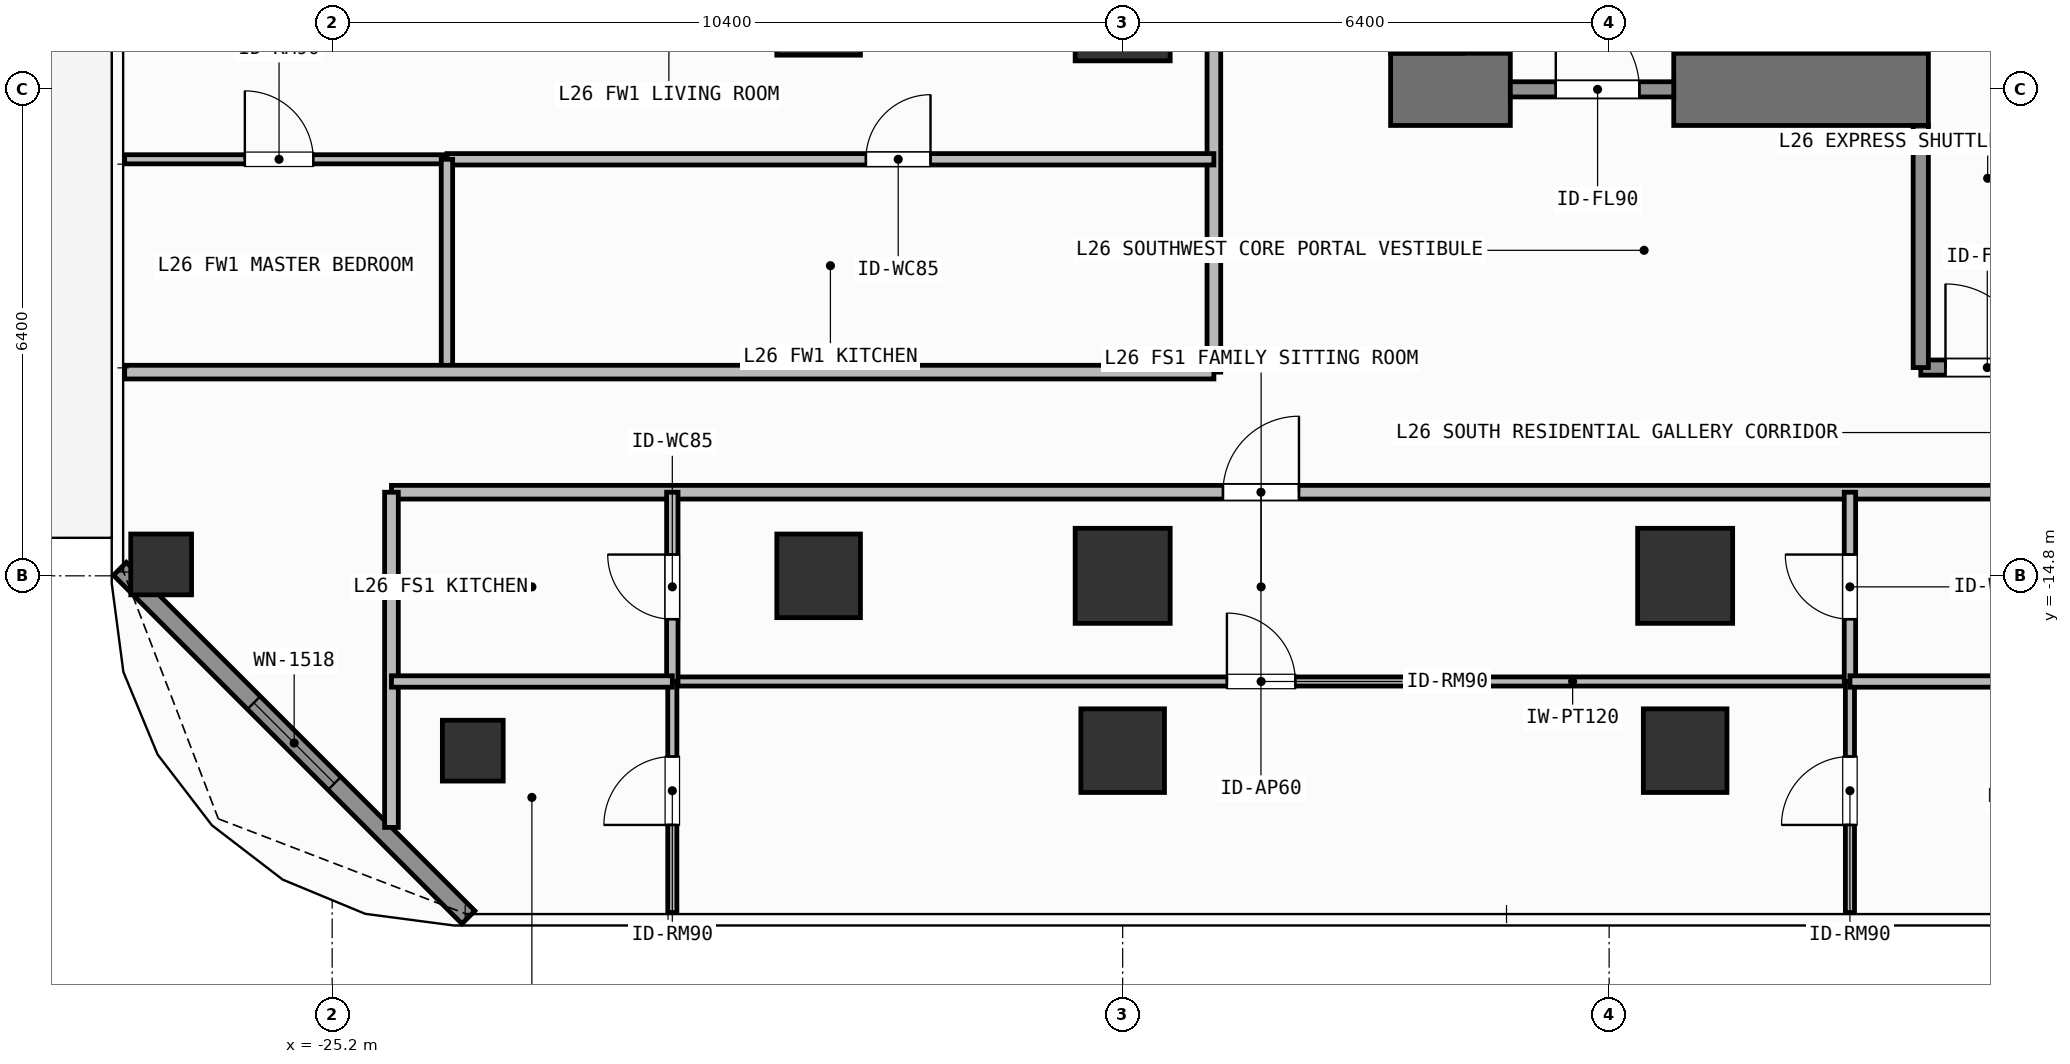
"""IFC4 building model, lengths in metres.
Left out: names, types, materials, properties, quantities, classifications, styles, units other than length and angle.
Written with IfcOpenShell. Run it as: python <this file> out.ifc"""

import sys

from ifc_helpers import new_model, si_unit, direction, frame, frame_2d, origin, origin_2d, place, context, subcontext, project, spatial, rectangle, hollow_rectangle, extrude, element, fill, save


model = new_model("IFC4")
c1 = context("Model", 3, precision=1e-05, world=origin(), true_north=direction((0.0, 1.0)))
c2 = subcontext(c1, "Body", "Model", "MODEL_VIEW")
j1 = project(units=[si_unit("LENGTHUNIT", "METRE"), si_unit("PLANEANGLEUNIT", "RADIAN")], contexts=[c1])
p1 = place(None, origin())
s1 = spatial("IfcSite", under=j1, at=p1, CompositionType="ELEMENT")
p2 = place(p1, origin())
s2 = spatial("IfcBuilding", under=s1, at=p2, CompositionType="ELEMENT")
p3 = place(p2, frame((0.0, 0.0, 104.7)))
s3 = spatial("IfcBuildingStorey", under=s2, at=p3, CompositionType="ELEMENT", Elevation=104.7)
p4 = place(p3, frame((-11.275, -8.4, 0.0), z_axis=(0.0, 0.0, 1.0), x_axis=(1.0, 0.0, 0.0)))
e1 = element("IfcWall", 1, at=p4, inside=s3, PredefinedType="SHEAR", context=c2, shape_type="SweptSolid", body=[
    extrude(rectangle(XDim=1.575, YDim=0.95, at=frame_2d((0.788, 0.0))), origin(), (0.0, 0.0, 1.0), 3.9),
])
p5 = place(p3, frame((-7.55, -8.4, 0.0), z_axis=(0.0, 0.0, 1.0), x_axis=(1.0, 0.0, 0.0)))
e2 = element("IfcWall", 2, at=p5, inside=s3, PredefinedType="SHEAR", context=c2, shape_type="SweptSolid", body=[
    extrude(rectangle(XDim=3.35, YDim=0.95, at=frame_2d((1.675, 0.0))), origin(), (0.0, 0.0, 1.0), 3.9),
])
p6 = place(p3, frame((-10.8, -7.925, 0.0), z_axis=(0.0, 0.0, 1.0), x_axis=(0.0, 1.0, 0.0)))
e3 = element("IfcWall", 3, at=p6, inside=s3, PredefinedType="SHEAR", context=c2, shape_type="SweptSolid", body=[
    extrude(rectangle(XDim=15.85, YDim=0.95, at=frame_2d((7.925, 0.0))), origin(), (0.0, 0.0, 1.0), 3.9),
])
for number, where, z_axis, x_axis in (
    (4, (-14.8, -14.8, 0.0), (0.0, 0.0, 1.0), (1.0, 0.0, 0.0)),
    (5, (-7.4, -14.8, 0.0), (0.0, 0.0, 1.0), (1.0, 0.0, 0.0)),
    (6, (-14.8, -7.4, 0.0), (0.0, 0.0, 1.0), (1.0, 0.0, 0.0)),
):
    element("IfcColumn", number, at=place(p3, frame(where, z_axis=z_axis, x_axis=x_axis)), inside=s3, PredefinedType="COLUMN", context=c2, shape_type="SweptSolid", body=[
        extrude(rectangle(XDim=1.25, YDim=1.25, at=origin_2d()), origin(), (0.0, 0.0, 1.0), 3.9),
    ])
for number, where, z_axis, x_axis in (
    (7, (-18.8, -14.8, 0.0), (0.0, 0.0, 1.0), (1.0, 0.0, 0.0)),
    (8, (-18.8, -7.4, 0.0), (0.0, 0.0, 1.0), (1.0, 0.0, 0.0)),
    (9, (-14.8, -17.1, 0.0), (0.0, 0.0, 1.0), (1.0, 0.0, 0.0)),
    (10, (-7.4, -17.1, 0.0), (0.0, 0.0, 1.0), (1.0, 0.0, 0.0)),
):
    element("IfcColumn", number, at=place(p3, frame(where, z_axis=z_axis, x_axis=x_axis)), inside=s3, PredefinedType="COLUMN", context=c2, shape_type="SweptSolid", body=[
        extrude(rectangle(XDim=1.1, YDim=1.1, at=origin_2d()), origin(), (0.0, 0.0, 1.0), 3.9),
    ])
for number, where, z_axis, x_axis in (
    (11, (-23.35, -17.1, 0.0), (0.0, 0.0, 1.0), (1.0, 0.0, 0.0)),
    (12, (-27.45, -14.65, 0.0), (0.0, 0.0, 1.0), (1.0, 0.0, 0.0)),
):
    element("IfcColumn", number, at=place(p3, frame(where, z_axis=z_axis, x_axis=x_axis)), inside=s3, PredefinedType="COLUMN", context=c2, shape_type="SweptSolid", body=[
        extrude(hollow_rectangle(XDim=0.8, YDim=0.8, WallThickness=0.036, at=origin_2d()), origin(), (0.0, 0.0, 1.0), 3.9),
    ])
p7 = place(p3, frame((-23.408, -19.292, 0.0), z_axis=(0.0, 0.0, 1.0), x_axis=(-0.707087954376, 0.707125607496, 0.0)))
e13 = element("IfcWall", 13, at=p7, inside=s3, PredefinedType="SOLIDWALL", context=c2, shape_type="SweptSolid", body=[
    extrude(rectangle(XDim=6.484, YDim=0.24, at=frame_2d((3.242, 0.0))), origin(), (0.0, 0.0, 1.0), 3.62),
])
p8 = place(p7, frame((2.492, 0.0, 0.8)))
e14 = element("IfcOpeningElement", 14, at=p8, cuts=e13, PredefinedType="OPENING", context=c2, shape_type="SweptSolid", body=[
    extrude(rectangle(XDim=1.5, YDim=1.85, at=frame_2d((0.75, 0.925))), frame((0.0, 0.13, 0.0), z_axis=(0.0, -1.0, 0.0), x_axis=(1.0, 0.0, 0.0)), (0.0, 0.0, 1.0), 0.26),
])
p9 = place(p3, frame((-9.7, -8.4, 0.0), z_axis=(0.0, 0.0, 1.0), x_axis=(1.0, 0.0, 0.0)))
e15 = element("IfcWall", 15, at=p9, inside=s3, PredefinedType="SOLIDWALL", context=c2, shape_type="SweptSolid", body=[
    extrude(rectangle(XDim=2.15, YDim=0.2, at=frame_2d((1.075, 0.0))), origin(), (0.0, 0.0, 1.0), 2.66),
])
p10 = place(p9, frame((0.598, 0.0, 0.0)))
e16 = element("IfcOpeningElement", 16, at=p10, cuts=e15, PredefinedType="OPENING", context=c2, shape_type="SweptSolid", body=[
    extrude(rectangle(XDim=1.1, YDim=2.15, at=frame_2d((0.55, 1.075))), frame((0.0, 0.11, 0.0), z_axis=(0.0, -1.0, 0.0), x_axis=(1.0, 0.0, 0.0)), (0.0, 0.0, 1.0), 0.22),
])
p11 = place(p3, frame((-4.3, -12.06, 0.0), z_axis=(0.0, 0.0, 1.0), x_axis=(1.0, 0.0, 0.0)))
e17 = element("IfcWall", 17, at=p11, inside=s3, PredefinedType="SOLIDWALL", context=c2, shape_type="SweptSolid", body=[
    extrude(rectangle(XDim=1.75, YDim=0.2, at=frame_2d((0.875, 0.0))), origin(), (0.0, 0.0, 1.0), 3.62),
])
p12 = place(p11, frame((0.325, 0.0, 0.0)))
e18 = element("IfcOpeningElement", 18, at=p12, cuts=e17, PredefinedType="OPENING", context=c2, shape_type="SweptSolid", body=[
    extrude(rectangle(XDim=1.1, YDim=2.15, at=frame_2d((0.55, 1.075))), frame((0.0, 0.11, 0.0), z_axis=(0.0, -1.0, 0.0), x_axis=(1.0, 0.0, 0.0)), (0.0, 0.0, 1.0), 0.22),
])
p13 = place(p3, frame((-24.42, -13.7, 0.0), z_axis=(0.0, 0.0, 1.0), x_axis=(1.0, 0.0, 0.0)))
e19 = element("IfcWall", 19, at=p13, inside=s3, PredefinedType="PARTITIONING", context=c2, shape_type="SweptSolid", body=[
    extrude(rectangle(XDim=25.394, YDim=0.18, at=frame_2d((12.697, 0.0))), origin(), (0.0, 0.0, 1.0), 3.62),
])
p14 = place(p13, frame((10.939, 0.0, 0.0)))
e20 = element("IfcOpeningElement", 20, at=p14, cuts=e19, PredefinedType="OPENING", context=c2, shape_type="SweptSolid", body=[
    extrude(rectangle(XDim=1.0, YDim=2.2, at=frame_2d((0.5, 1.1))), frame((0.0, 0.1, 0.0), z_axis=(0.0, -1.0, 0.0), x_axis=(1.0, 0.0, 0.0)), (0.0, 0.0, 1.0), 0.2),
])
p15 = place(p3, frame((-20.725, -16.19, 0.0), z_axis=(0.0, 0.0, 1.0), x_axis=(1.0, 0.0, 0.0)))
e21 = element("IfcWall", 21, at=p15, inside=s3, PredefinedType="PARTITIONING", context=c2, shape_type="SweptSolid", body=[
    extrude(rectangle(XDim=15.493, YDim=0.12, at=frame_2d((7.747, 0.0))), origin(), (0.0, 0.0, 1.0), 3.62),
])
p16 = place(p15, frame((7.296, 0.0, 0.0)))
e22 = element("IfcOpeningElement", 22, at=p16, cuts=e21, PredefinedType="OPENING", context=c2, shape_type="SweptSolid", body=[
    extrude(rectangle(XDim=0.9, YDim=2.1, at=frame_2d((0.45, 1.05))), frame((0.0, 0.07, 0.0), z_axis=(0.0, -1.0, 0.0), x_axis=(1.0, 0.0, 0.0)), (0.0, 0.0, 1.0), 0.14),
])
p17 = place(p3, frame((-20.725, -16.19, 0.0), z_axis=(0.0, 0.0, 1.0), x_axis=(0.0, 1.0, 0.0)))
e23 = element("IfcWall", 23, at=p17, inside=s3, PredefinedType="PARTITIONING", context=c2, shape_type="SweptSolid", body=[
    extrude(rectangle(XDim=2.49, YDim=0.15, at=frame_2d((1.245, 0.0))), origin(), (0.0, 0.0, 1.0), 3.62),
])
p18 = place(p17, frame((0.82, 0.0, 0.0)))
e24 = element("IfcOpeningElement", 24, at=p18, cuts=e23, PredefinedType="OPENING", context=c2, shape_type="SweptSolid", body=[
    extrude(rectangle(XDim=0.85, YDim=2.1, at=frame_2d((0.425, 1.05))), frame((0.0, 0.085, 0.0), z_axis=(0.0, -1.0, 0.0), x_axis=(1.0, 0.0, 0.0)), (0.0, 0.0, 1.0), 0.17),
])
p19 = place(p3, frame((-20.725, -19.23, 0.0), z_axis=(0.0, 0.0, 1.0), x_axis=(0.0, 1.0, 0.0)))
e25 = element("IfcWall", 25, at=p19, inside=s3, PredefinedType="PARTITIONING", context=c2, shape_type="SweptSolid", body=[
    extrude(rectangle(XDim=3.04, YDim=0.12, at=frame_2d((1.52, 0.0))), origin(), (0.0, 0.0, 1.0), 3.62),
])
p20 = place(p19, frame((1.153, 0.0, 0.0)))
e26 = element("IfcOpeningElement", 26, at=p20, cuts=e25, PredefinedType="OPENING", context=c2, shape_type="SweptSolid", body=[
    extrude(rectangle(XDim=0.9, YDim=2.1, at=frame_2d((0.45, 1.05))), frame((0.0, 0.07, 0.0), z_axis=(0.0, -1.0, 0.0), x_axis=(1.0, 0.0, 0.0)), (0.0, 0.0, 1.0), 0.14),
])
p21 = place(p3, frame((-5.232, -16.19, 0.0), z_axis=(0.0, 0.0, 1.0), x_axis=(0.0, 1.0, 0.0)))
e27 = element("IfcWall", 27, at=p21, inside=s3, PredefinedType="PARTITIONING", context=c2, shape_type="SweptSolid", body=[
    extrude(rectangle(XDim=2.49, YDim=0.15, at=frame_2d((1.245, 0.0))), origin(), (0.0, 0.0, 1.0), 3.62),
])
p22 = place(p21, frame((0.82, 0.0, 0.0)))
e28 = element("IfcOpeningElement", 28, at=p22, cuts=e27, PredefinedType="OPENING", context=c2, shape_type="SweptSolid", body=[
    extrude(rectangle(XDim=0.85, YDim=2.1, at=frame_2d((0.425, 1.05))), frame((0.0, 0.085, 0.0), z_axis=(0.0, -1.0, 0.0), x_axis=(1.0, 0.0, 0.0)), (0.0, 0.0, 1.0), 0.17),
])
p23 = place(p3, frame((-5.232, -19.23, 0.0), z_axis=(0.0, 0.0, 1.0), x_axis=(0.0, 1.0, 0.0)))
e29 = element("IfcWall", 29, at=p23, inside=s3, PredefinedType="PARTITIONING", context=c2, shape_type="SweptSolid", body=[
    extrude(rectangle(XDim=3.04, YDim=0.12, at=frame_2d((1.52, 0.0))), origin(), (0.0, 0.0, 1.0), 3.62),
])
p24 = place(p23, frame((1.153, 0.0, 0.0)))
e30 = element("IfcOpeningElement", 30, at=p24, cuts=e29, PredefinedType="OPENING", context=c2, shape_type="SweptSolid", body=[
    extrude(rectangle(XDim=0.9, YDim=2.1, at=frame_2d((0.45, 1.05))), frame((0.0, 0.07, 0.0), z_axis=(0.0, -1.0, 0.0), x_axis=(1.0, 0.0, 0.0)), (0.0, 0.0, 1.0), 0.14),
])
p25 = place(p3, frame((-13.6, -12.12, 0.0), z_axis=(0.0, 0.0, 1.0), x_axis=(0.0, 1.0, 0.0)))
e31 = element("IfcWall", 31, at=p25, inside=s3, PredefinedType="PARTITIONING", context=c2, shape_type="SweptSolid", body=[
    extrude(rectangle(XDim=10.52, YDim=0.18, at=frame_2d((5.26, 0.0))), origin(), (0.0, 0.0, 1.0), 3.62),
])
p26 = place(p25, frame((5.468, 0.0, 0.0)))
e32 = element("IfcOpeningElement", 32, at=p26, cuts=e31, PredefinedType="OPENING", context=c2, shape_type="SweptSolid", body=[
    extrude(rectangle(XDim=1.0, YDim=2.2, at=frame_2d((0.5, 1.1))), frame((0.0, 0.1, 0.0), z_axis=(0.0, -1.0, 0.0), x_axis=(1.0, 0.0, 0.0)), (0.0, 0.0, 1.0), 0.2),
])
p27 = place(p3, frame((-23.69, -9.32, 0.0), z_axis=(0.0, 0.0, 1.0), x_axis=(1.0, 0.0, 0.0)))
e33 = element("IfcWall", 33, at=p27, inside=s3, PredefinedType="PARTITIONING", context=c2, shape_type="SweptSolid", body=[
    extrude(rectangle(XDim=10.09, YDim=0.15, at=frame_2d((5.045, 0.0))), origin(), (0.0, 0.0, 1.0), 3.62),
])
p28 = place(p27, frame((5.512, 0.0, 0.0)))
e34 = element("IfcOpeningElement", 34, at=p28, cuts=e33, PredefinedType="OPENING", context=c2, shape_type="SweptSolid", body=[
    extrude(rectangle(XDim=0.85, YDim=2.1, at=frame_2d((0.425, 1.05))), frame((0.0, 0.085, 0.0), z_axis=(0.0, -1.0, 0.0), x_axis=(1.0, 0.0, 0.0)), (0.0, 0.0, 1.0), 0.17),
])
p29 = place(p3, frame((-27.93, -9.32, 0.0), z_axis=(0.0, 0.0, 1.0), x_axis=(1.0, 0.0, 0.0)))
e35 = element("IfcWall", 35, at=p29, inside=s3, PredefinedType="PARTITIONING", context=c2, shape_type="SweptSolid", body=[
    extrude(rectangle(XDim=4.24, YDim=0.12, at=frame_2d((2.12, 0.0))), origin(), (0.0, 0.0, 1.0), 3.62),
])
p30 = place(p29, frame((1.581, 0.0, 0.0)))
e36 = element("IfcOpeningElement", 36, at=p30, cuts=e35, PredefinedType="OPENING", context=c2, shape_type="SweptSolid", body=[
    extrude(rectangle(XDim=0.9, YDim=2.1, at=frame_2d((0.45, 1.05))), frame((0.0, 0.07, 0.0), z_axis=(0.0, -1.0, 0.0), x_axis=(1.0, 0.0, 0.0)), (0.0, 0.0, 1.0), 0.14),
])
p31 = place(p3, frame((-4.3, -12.06, 0.0), z_axis=(0.0, 0.0, 1.0), x_axis=(0.0, 1.0, 0.0)))
e37 = element("IfcWall", 37, at=p31, inside=s3, PredefinedType="SOLIDWALL", context=c2, shape_type="SweptSolid", body=[
    extrude(rectangle(XDim=3.185, YDim=0.2, at=frame_2d((1.593, 0.0))), origin(), (0.0, 0.0, 1.0), 3.62),
])
p32 = place(p3, frame((-24.42, -18.11, 0.0), z_axis=(0.0, 0.0, 1.0), x_axis=(0.0, 1.0, 0.0)))
e38 = element("IfcWall", 38, at=p32, inside=s3, PredefinedType="PARTITIONING", context=c2, shape_type="SweptSolid", body=[
    extrude(rectangle(XDim=4.41, YDim=0.18, at=frame_2d((2.205, 0.0))), origin(), (0.0, 0.0, 1.0), 3.62),
])
p33 = place(p3, frame((-24.42, -16.19, 0.0), z_axis=(0.0, 0.0, 1.0), x_axis=(1.0, 0.0, 0.0)))
e39 = element("IfcWall", 39, at=p33, inside=s3, PredefinedType="PARTITIONING", context=c2, shape_type="SweptSolid", body=[
    extrude(rectangle(XDim=3.695, YDim=0.15, at=frame_2d((1.847, 0.0))), origin(), (0.0, 0.0, 1.0), 3.62),
])
p34 = place(p3, frame((-5.232, -16.19, 0.0), z_axis=(0.0, 0.0, 1.0), x_axis=(1.0, 0.0, 0.0)))
e40 = element("IfcWall", 40, at=p34, inside=s3, PredefinedType="PARTITIONING", context=c2, shape_type="SweptSolid", body=[
    extrude(rectangle(XDim=6.206, YDim=0.15, at=frame_2d((3.103, 0.0))), origin(), (0.0, 0.0, 1.0), 3.62),
])
p35 = place(p3, frame((-23.69, -12.12, 0.0), z_axis=(0.0, 0.0, 1.0), x_axis=(0.0, 1.0, 0.0)))
e41 = element("IfcWall", 41, at=p35, inside=s3, PredefinedType="PARTITIONING", context=c2, shape_type="SweptSolid", body=[
    extrude(rectangle(XDim=2.8, YDim=0.15, at=frame_2d((1.4, 0.0))), origin(), (0.0, 0.0, 1.0), 3.62),
])
p36 = place(p3, frame((-27.93, -12.12, 0.0), z_axis=(0.0, 0.0, 1.0), x_axis=(1.0, 0.0, 0.0)))
e42 = element("IfcWall", 42, at=p36, inside=s3, PredefinedType="PARTITIONING", context=c2, shape_type="SweptSolid", body=[
    extrude(rectangle(XDim=14.33, YDim=0.18, at=frame_2d((7.165, 0.0))), origin(), (0.0, 0.0, 1.0), 3.62),
])
p37 = place(p8, origin())
e43 = element("IfcWindow", 43, at=p37, inside=s3, PartitioningType="SINGLE_PANEL", PredefinedType="WINDOW", context=c2, shape_type="SweptSolid", body=[
    extrude(rectangle(XDim=1.5, YDim=1.85, at=frame_2d((0.75, 0.925))), frame((0.0, 0.03, 0.0), z_axis=(0.0, -1.0, 0.0), x_axis=(1.0, 0.0, 0.0)), (0.0, 0.0, 1.0), 0.06),
])
fill(e14, e43)
p38 = place(p10, origin())
e44 = element("IfcDoor", 44, at=p38, inside=s3, OperationType="SINGLE_SWING_LEFT", PredefinedType="DOOR", context=c2, shape_type="SweptSolid", body=[
    extrude(rectangle(XDim=1.1, YDim=2.15, at=frame_2d((0.55, 1.075))), frame((0.0, 0.025, 0.0), z_axis=(0.0, -1.0, 0.0), x_axis=(1.0, 0.0, 0.0)), (0.0, 0.0, 1.0), 0.05),
])
fill(e16, e44)
p39 = place(p12, origin())
e45 = element("IfcDoor", 45, at=p39, inside=s3, OperationType="SINGLE_SWING_LEFT", PredefinedType="DOOR", context=c2, shape_type="SweptSolid", body=[
    extrude(rectangle(XDim=1.1, YDim=2.15, at=frame_2d((0.55, 1.075))), frame((0.0, 0.025, 0.0), z_axis=(0.0, -1.0, 0.0), x_axis=(1.0, 0.0, 0.0)), (0.0, 0.0, 1.0), 0.05),
])
fill(e18, e45)
p40 = place(p14, origin())
e46 = element("IfcDoor", 46, at=p40, inside=s3, OperationType="SINGLE_SWING_RIGHT", PredefinedType="DOOR", context=c2, shape_type="SweptSolid", body=[
    extrude(rectangle(XDim=1.0, YDim=2.2, at=frame_2d((0.5, 1.1))), frame((0.0, 0.025, 0.0), z_axis=(0.0, -1.0, 0.0), x_axis=(1.0, 0.0, 0.0)), (0.0, 0.0, 1.0), 0.05),
])
fill(e20, e46)
p41 = place(p16, origin())
e47 = element("IfcDoor", 47, at=p41, inside=s3, OperationType="SINGLE_SWING_LEFT", PredefinedType="DOOR", context=c2, shape_type="SweptSolid", body=[
    extrude(rectangle(XDim=0.9, YDim=2.1, at=frame_2d((0.45, 1.05))), frame((0.0, 0.025, 0.0), z_axis=(0.0, -1.0, 0.0), x_axis=(1.0, 0.0, 0.0)), (0.0, 0.0, 1.0), 0.05),
])
fill(e22, e47)
p42 = place(p18, origin())
e48 = element("IfcDoor", 48, at=p42, inside=s3, OperationType="SINGLE_SWING_RIGHT", PredefinedType="DOOR", context=c2, shape_type="SweptSolid", body=[
    extrude(rectangle(XDim=0.85, YDim=2.1, at=frame_2d((0.425, 1.05))), frame((0.0, 0.025, 0.0), z_axis=(0.0, -1.0, 0.0), x_axis=(1.0, 0.0, 0.0)), (0.0, 0.0, 1.0), 0.05),
])
fill(e24, e48)
p43 = place(p20, origin())
e49 = element("IfcDoor", 49, at=p43, inside=s3, OperationType="SINGLE_SWING_LEFT", PredefinedType="DOOR", context=c2, shape_type="SweptSolid", body=[
    extrude(rectangle(XDim=0.9, YDim=2.1, at=frame_2d((0.45, 1.05))), frame((0.0, 0.025, 0.0), z_axis=(0.0, -1.0, 0.0), x_axis=(1.0, 0.0, 0.0)), (0.0, 0.0, 1.0), 0.05),
])
fill(e26, e49)
p44 = place(p22, origin())
e50 = element("IfcDoor", 50, at=p44, inside=s3, OperationType="SINGLE_SWING_RIGHT", PredefinedType="DOOR", context=c2, shape_type="SweptSolid", body=[
    extrude(rectangle(XDim=0.85, YDim=2.1, at=frame_2d((0.425, 1.05))), frame((0.0, 0.025, 0.0), z_axis=(0.0, -1.0, 0.0), x_axis=(1.0, 0.0, 0.0)), (0.0, 0.0, 1.0), 0.05),
])
fill(e28, e50)
p45 = place(p24, origin())
e51 = element("IfcDoor", 51, at=p45, inside=s3, OperationType="SINGLE_SWING_LEFT", PredefinedType="DOOR", context=c2, shape_type="SweptSolid", body=[
    extrude(rectangle(XDim=0.9, YDim=2.1, at=frame_2d((0.45, 1.05))), frame((0.0, 0.025, 0.0), z_axis=(0.0, -1.0, 0.0), x_axis=(1.0, 0.0, 0.0)), (0.0, 0.0, 1.0), 0.05),
])
fill(e30, e51)
p46 = place(p28, origin())
e52 = element("IfcDoor", 52, at=p46, inside=s3, OperationType="SINGLE_SWING_RIGHT", PredefinedType="DOOR", context=c2, shape_type="SweptSolid", body=[
    extrude(rectangle(XDim=0.85, YDim=2.1, at=frame_2d((0.425, 1.05))), frame((0.0, 0.025, 0.0), z_axis=(0.0, -1.0, 0.0), x_axis=(1.0, 0.0, 0.0)), (0.0, 0.0, 1.0), 0.05),
])
fill(e34, e52)
p47 = place(p30, origin())
e53 = element("IfcDoor", 53, at=p47, inside=s3, OperationType="SINGLE_SWING_LEFT", PredefinedType="DOOR", context=c2, shape_type="SweptSolid", body=[
    extrude(rectangle(XDim=0.9, YDim=2.1, at=frame_2d((0.45, 1.05))), frame((0.0, 0.025, 0.0), z_axis=(0.0, -1.0, 0.0), x_axis=(1.0, 0.0, 0.0)), (0.0, 0.0, 1.0), 0.05),
])
fill(e36, e53)
save(model, sys.argv[1])
